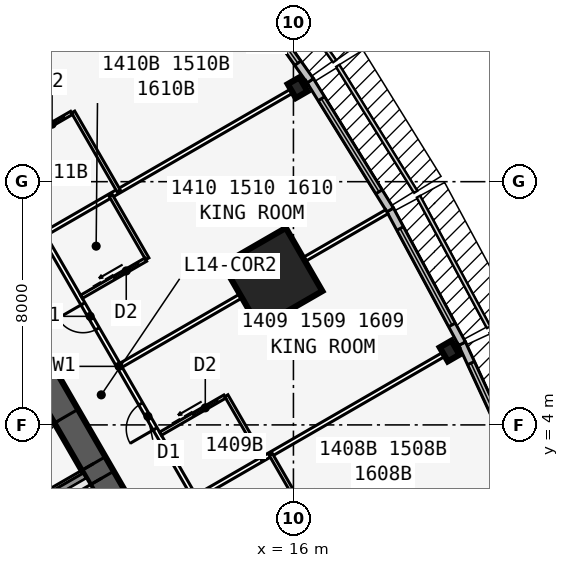
"""IFC4 building model, lengths in metres.
Left out: names, types, materials, properties, quantities, classifications, styles, units other than length and angle.
Written with IfcOpenShell. Run it as: python <this file> out.ifc"""

import sys

from ifc_helpers import new_model, si_unit, direction, frame, frame_2d, origin, origin_2d, place, context, subcontext, project, spatial, rectangle, i_section, extrude, element, fill, save


model = new_model("IFC4")
c1 = context("Model", 3, precision=1e-05, world=origin(), true_north=direction((0.0, 1.0)))
c2 = subcontext(c1, "Body", "Model", "MODEL_VIEW")
j1 = project(units=[si_unit("LENGTHUNIT", "METRE"), si_unit("PLANEANGLEUNIT", "RADIAN")], contexts=[c1])
p1 = place(None, origin())
s1 = spatial("IfcSite", under=j1, at=p1, CompositionType="ELEMENT")
p2 = place(p1, origin())
s2 = spatial("IfcBuilding", under=s1, at=p2, CompositionType="ELEMENT")
p3 = place(p2, frame((0.0, 0.0, 59.1)))
s3 = spatial("IfcBuildingStorey", under=s2, at=p3, CompositionType="ELEMENT", Elevation=59.1)
p4 = place(p3, frame((16.5, -9.526, 0.0), z_axis=(0.0, 0.0, 1.0), x_axis=(-0.499999749417, 0.866025548458, 0.0)))
e1 = element("IfcWall", 1, at=p4, inside=s3, PredefinedType="SHEAR", context=c2, shape_type="SweptSolid", body=[
    extrude(rectangle(XDim=33.0, YDim=0.9, at=frame_2d((16.5, 0.0))), origin(), (0.0, 0.0, 1.0), 3.4),
])
p5 = place(p4, frame((14.15, 0.0, 0.0)))
e2 = element("IfcOpeningElement", 2, at=p5, cuts=e1, PredefinedType="OPENING", context=c2, shape_type="SweptSolid", body=[
    extrude(rectangle(XDim=1.8, YDim=2.13, at=frame_2d((0.9, 1.065))), frame((0.0, 0.46, 0.0), z_axis=(0.0, -1.0, 0.0), x_axis=(1.0, 0.0, 0.0)), (0.0, 0.0, 1.0), 0.92),
])
p6 = place(p4, frame((12.6, 0.0, 0.0)))
e3 = element("IfcOpeningElement", 3, at=p6, cuts=e1, PredefinedType="OPENING", context=c2, shape_type="SweptSolid", body=[
    extrude(rectangle(XDim=1.0, YDim=2.13, at=frame_2d((0.5, 1.065))), frame((0.0, 0.46, 0.0), z_axis=(0.0, -1.0, 0.0), x_axis=(1.0, 0.0, 0.0)), (0.0, 0.0, 1.0), 0.92),
])
for number, where, z_axis, x_axis in (
    (4, (6.429, 0.767, 0.0), (0.0, 0.0, 1.0), (0.866, 0.5, 0.0)),
    (5, (5.329, 2.673, 0.0), (0.0, 0.0, 1.0), (0.866, 0.5, 0.0)),
):
    element("IfcWall", number, at=place(p3, frame(where, z_axis=z_axis, x_axis=x_axis)), inside=s3, PredefinedType="SOLIDWALL", context=c2, shape_type="SweptSolid", body=[
        extrude(rectangle(XDim=3.125, YDim=0.2, at=frame_2d((1.562, 0.0))), origin(), (0.0, 0.0, 1.0), 3.235),
    ])
for number, where, z_axis, x_axis in (
    (6, (21.137, 6.43, 0.0), (0.0, 0.0, 1.0), (0.866, 0.5, 0.0)),
    (7, (16.137, 15.09, 0.0), (0.0, 0.0, 1.0), (0.866, 0.5, 0.0)),
):
    element("IfcColumn", number, at=place(p3, frame(where, z_axis=z_axis, x_axis=x_axis)), inside=s3, PredefinedType="COLUMN", context=c2, shape_type="SweptSolid", body=[
        extrude(i_section(OverallWidth=0.442, OverallDepth=0.531, WebThickness=0.066, FlangeThickness=0.106, at=origin_2d()), origin(), (0.0, 0.0, 1.0), 3.4),
    ])
p7 = place(p3, frame((15.312, 8.84, 0.0), z_axis=(0.0, 0.0, 1.0), x_axis=(0.866025403784, 0.5, 0.0)))
e8 = element("IfcColumn", 8, at=p7, inside=s3, PredefinedType="COLUMN", context=c2, shape_type="SweptSolid", body=[
    extrude(rectangle(XDim=2.4, YDim=2.4, at=origin_2d()), origin(), (0.0, 0.0, 1.0), 3.4),
])
p8 = place(p3, frame((23.648, 2.119, 0.0), z_axis=(0.0, 0.0, 1.0), x_axis=(-0.419203100754, 0.907892482796, 0.0)))
e9 = element("IfcWall", 9, at=p8, inside=s3, PredefinedType="STANDARD", context=c2, shape_type="SweptSolid", body=[
    extrude(rectangle(XDim=5.021, YDim=0.25, at=frame_2d((2.51, 0.0))), origin(), (0.0, 0.0, 1.0), 3.235),
])
p9 = place(p8, frame((0.71, 0.0, 0.45)))
e10 = element("IfcOpeningElement", 10, at=p9, cuts=e9, PredefinedType="OPENING", context=c2, shape_type="SweptSolid", body=[
    extrude(rectangle(XDim=3.6, YDim=2.4, at=frame_2d((1.8, 1.2))), frame((0.0, 0.135, 0.0), z_axis=(0.0, -1.0, 0.0), x_axis=(1.0, 0.0, 0.0)), (0.0, 0.0, 1.0), 0.27),
])
p10 = place(p3, frame((21.547, 6.671, 0.0), z_axis=(0.0, 0.0, 1.0), x_axis=(-0.473412820489, 0.880840678782, 0.0)))
e11 = element("IfcWall", 11, at=p10, inside=s3, PredefinedType="STANDARD", context=c2, shape_type="SweptSolid", body=[
    extrude(rectangle(XDim=5.002, YDim=0.25, at=frame_2d((2.501, 0.0))), origin(), (0.0, 0.0, 1.0), 3.235),
])
p11 = place(p10, frame((0.701, 0.0, 0.45)))
e12 = element("IfcOpeningElement", 12, at=p11, cuts=e11, PredefinedType="OPENING", context=c2, shape_type="SweptSolid", body=[
    extrude(rectangle(XDim=3.6, YDim=2.4, at=frame_2d((1.8, 1.2))), frame((0.0, 0.135, 0.0), z_axis=(0.0, -1.0, 0.0), x_axis=(1.0, 0.0, 0.0)), (0.0, 0.0, 1.0), 0.27),
])
p12 = place(p3, frame((19.182, 11.071, 0.0), z_axis=(0.0, 0.0, 1.0), x_axis=(-0.526132807704, 0.850402415717, 0.0)))
e13 = element("IfcWall", 13, at=p12, inside=s3, PredefinedType="STANDARD", context=c2, shape_type="SweptSolid", body=[
    extrude(rectangle(XDim=5.002, YDim=0.25, at=frame_2d((2.501, 0.0))), origin(), (0.0, 0.0, 1.0), 3.235),
])
p13 = place(p12, frame((0.701, 0.0, 0.45)))
e14 = element("IfcOpeningElement", 14, at=p13, cuts=e13, PredefinedType="OPENING", context=c2, shape_type="SweptSolid", body=[
    extrude(rectangle(XDim=3.6, YDim=2.4, at=frame_2d((1.8, 1.2))), frame((0.0, 0.135, 0.0), z_axis=(0.0, -1.0, 0.0), x_axis=(1.0, 0.0, 0.0)), (0.0, 0.0, 1.0), 0.27),
])
p14 = place(p3, frame((16.555, 15.318, 0.0), z_axis=(0.0, 0.0, 1.0), x_axis=(-0.5766431066, 0.81699616132, 0.0)))
e15 = element("IfcWall", 15, at=p14, inside=s3, PredefinedType="STANDARD", context=c2, shape_type="SweptSolid", body=[
    extrude(rectangle(XDim=5.021, YDim=0.25, at=frame_2d((2.51, 0.0))), origin(), (0.0, 0.0, 1.0), 3.235),
])
p15 = place(p14, frame((0.71, 0.0, 0.45)))
e16 = element("IfcOpeningElement", 16, at=p15, cuts=e15, PredefinedType="OPENING", context=c2, shape_type="SweptSolid", body=[
    extrude(rectangle(XDim=3.6, YDim=2.4, at=frame_2d((1.8, 1.2))), frame((0.0, 0.135, 0.0), z_axis=(0.0, -1.0, 0.0), x_axis=(1.0, 0.0, 0.0)), (0.0, 0.0, 1.0), 0.27),
])
p16 = place(p3, frame((20.027, -10.985, 0.0), z_axis=(0.0, 0.0, 1.0), x_axis=(-0.500001677587, 0.866024435227, 0.0)))
e17 = element("IfcWall", 17, at=p16, inside=s3, PredefinedType="PARTITIONING", context=c2, shape_type="SweptSolid", body=[
    extrude(rectangle(XDim=39.054, YDim=0.15, at=frame_2d((19.527, 0.0))), origin(), (0.0, 0.0, 1.0), 3.235),
])
p17 = place(p16, frame((0.352, 0.0, 0.0)))
e18 = element("IfcOpeningElement", 18, at=p17, cuts=e17, PredefinedType="OPENING", context=c2, shape_type="SweptSolid", body=[
    extrude(rectangle(XDim=0.95, YDim=2.13, at=frame_2d((0.475, 1.065))), frame((0.0, 0.085, 0.0), z_axis=(0.0, -1.0, 0.0), x_axis=(1.0, 0.0, 0.0)), (0.0, 0.0, 1.0), 0.17),
])
p18 = place(p16, frame((10.352, 0.0, 0.0)))
e19 = element("IfcOpeningElement", 19, at=p18, cuts=e17, PredefinedType="OPENING", context=c2, shape_type="SweptSolid", body=[
    extrude(rectangle(XDim=0.95, YDim=2.13, at=frame_2d((0.475, 1.065))), frame((0.0, 0.085, 0.0), z_axis=(0.0, -1.0, 0.0), x_axis=(1.0, 0.0, 0.0)), (0.0, 0.0, 1.0), 0.17),
])
p19 = place(p16, frame((17.152, 0.0, 0.0)))
e20 = element("IfcOpeningElement", 20, at=p19, cuts=e17, PredefinedType="OPENING", context=c2, shape_type="SweptSolid", body=[
    extrude(rectangle(XDim=0.95, YDim=2.13, at=frame_2d((0.475, 1.065))), frame((0.0, 0.085, 0.0), z_axis=(0.0, -1.0, 0.0), x_axis=(1.0, 0.0, 0.0)), (0.0, 0.0, 1.0), 0.17),
])
p20 = place(p16, frame((20.952, 0.0, 0.0)))
e21 = element("IfcOpeningElement", 21, at=p20, cuts=e17, PredefinedType="OPENING", context=c2, shape_type="SweptSolid", body=[
    extrude(rectangle(XDim=0.95, YDim=2.13, at=frame_2d((0.475, 1.065))), frame((0.0, 0.085, 0.0), z_axis=(0.0, -1.0, 0.0), x_axis=(1.0, 0.0, 0.0)), (0.0, 0.0, 1.0), 0.17),
])
p21 = place(p16, frame((27.752, 0.0, 0.0)))
e22 = element("IfcOpeningElement", 22, at=p21, cuts=e17, PredefinedType="OPENING", context=c2, shape_type="SweptSolid", body=[
    extrude(rectangle(XDim=0.95, YDim=2.13, at=frame_2d((0.475, 1.065))), frame((0.0, 0.085, 0.0), z_axis=(0.0, -1.0, 0.0), x_axis=(1.0, 0.0, 0.0)), (0.0, 0.0, 1.0), 0.17),
])
p22 = place(p16, frame((37.752, 0.0, 0.0)))
e23 = element("IfcOpeningElement", 23, at=p22, cuts=e17, PredefinedType="OPENING", context=c2, shape_type="SweptSolid", body=[
    extrude(rectangle(XDim=0.95, YDim=2.13, at=frame_2d((0.475, 1.065))), frame((0.0, 0.085, 0.0), z_axis=(0.0, -1.0, 0.0), x_axis=(1.0, 0.0, 0.0)), (0.0, 0.0, 1.0), 0.17),
])
p23 = place(p3, frame((12.829, 1.633, 0.0), z_axis=(0.0, 0.0, 1.0), x_axis=(0.866026934769, 0.499997348248, 0.0)))
e24 = element("IfcWall", 24, at=p23, inside=s3, PredefinedType="PARTITIONING", context=c2, shape_type="SweptSolid", body=[
    extrude(rectangle(XDim=9.943, YDim=0.15, at=frame_2d((4.971, 0.0))), origin(), (0.0, 0.0, 1.0), 2.389),
])
p24 = place(p3, frame((10.329, 5.963, 0.0), z_axis=(0.0, 0.0, 1.0), x_axis=(0.866021688545, 0.500006434927, 0.0)))
e25 = element("IfcWall", 25, at=p24, inside=s3, PredefinedType="PARTITIONING", context=c2, shape_type="SweptSolid", body=[
    extrude(rectangle(XDim=10.096, YDim=0.15, at=frame_2d((5.048, 0.0))), origin(), (0.0, 0.0, 1.0), 2.389),
])
p25 = place(p3, frame((7.829, 10.293, 0.0), z_axis=(0.0, 0.0, 1.0), x_axis=(0.866016302457, 0.50001576363, 0.0)))
e26 = element("IfcWall", 26, at=p25, inside=s3, PredefinedType="PARTITIONING", context=c2, shape_type="SweptSolid", body=[
    extrude(rectangle(XDim=9.943, YDim=0.15, at=frame_2d((4.972, 0.0))), origin(), (0.0, 0.0, 1.0), 2.389),
])
p26 = place(p3, frame((16.753, 0.435, 0.0), z_axis=(0.0, 0.0, 1.0), x_axis=(-0.499990139034, 0.866031096941, 0.0)))
e27 = element("IfcWall", 27, at=p26, inside=s3, PredefinedType="PLUMBINGWALL", context=c2, shape_type="SweptSolid", body=[
    extrude(rectangle(XDim=3.0, YDim=0.12, at=frame_2d((1.5, 0.0))), origin(), (0.0, 0.0, 1.0), 3.235),
])
p27 = place(p3, frame((14.993, 2.883, 0.0), z_axis=(0.0, 0.0, 1.0), x_axis=(-0.500001309137, 0.866024647952, 0.0)))
e28 = element("IfcWall", 28, at=p27, inside=s3, PredefinedType="PLUMBINGWALL", context=c2, shape_type="SweptSolid", body=[
    extrude(rectangle(XDim=2.4, YDim=0.12, at=frame_2d((1.2, 0.0))), origin(), (0.0, 0.0, 1.0), 3.235),
])
p28 = place(p3, frame((11.628, 3.711, 0.0), z_axis=(0.0, 0.0, 1.0), x_axis=(0.866048967903, 0.499959183527, 0.0)))
e29 = element("IfcWall", 29, at=p28, inside=s3, PredefinedType="PLUMBINGWALL", context=c2, shape_type="SweptSolid", body=[
    extrude(rectangle(XDim=2.44, YDim=0.12, at=frame_2d((1.22, 0.0))), origin(), (0.0, 0.0, 1.0), 3.235),
])
p29 = place(p28, frame((1.25, 0.0, 0.0)))
e30 = element("IfcOpeningElement", 30, at=p29, cuts=e29, PredefinedType="OPENING", context=c2, shape_type="SweptSolid", body=[
    extrude(rectangle(XDim=0.9, YDim=2.13, at=frame_2d((0.45, 1.065))), frame((0.0, 0.07, 0.0), z_axis=(0.0, -1.0, 0.0), x_axis=(1.0, 0.0, 0.0)), (0.0, 0.0, 1.0), 0.14),
])
p30 = place(p3, frame((11.194, 9.465, 0.0), z_axis=(0.0, 0.0, 1.0), x_axis=(-0.500077600433, 0.865980596518, 0.0)))
e31 = element("IfcWall", 31, at=p30, inside=s3, PredefinedType="PLUMBINGWALL", context=c2, shape_type="SweptSolid", body=[
    extrude(rectangle(XDim=2.4, YDim=0.12, at=frame_2d((1.2, 0.0))), origin(), (0.0, 0.0, 1.0), 3.235),
])
p31 = place(p3, frame((9.029, 8.215, 0.0), z_axis=(0.0, 0.0, 1.0), x_axis=(0.866023955769, 0.500002508028, 0.0)))
e32 = element("IfcWall", 32, at=p31, inside=s3, PredefinedType="PLUMBINGWALL", context=c2, shape_type="SweptSolid", body=[
    extrude(rectangle(XDim=2.44, YDim=0.12, at=frame_2d((1.22, 0.0))), origin(), (0.0, 0.0, 1.0), 3.235),
])
p32 = place(p31, frame((1.25, 0.0, 0.0)))
e33 = element("IfcOpeningElement", 33, at=p32, cuts=e32, PredefinedType="OPENING", context=c2, shape_type="SweptSolid", body=[
    extrude(rectangle(XDim=0.9, YDim=2.13, at=frame_2d((0.45, 1.065))), frame((0.0, 0.07, 0.0), z_axis=(0.0, -1.0, 0.0), x_axis=(1.0, 0.0, 0.0)), (0.0, 0.0, 1.0), 0.14),
])
p33 = place(p3, frame((10.253, 11.693, 0.0), z_axis=(0.0, 0.0, 1.0), x_axis=(-0.50002537861, 0.866010750942, 0.0)))
e34 = element("IfcWall", 34, at=p33, inside=s3, PredefinedType="PLUMBINGWALL", context=c2, shape_type="SweptSolid", body=[
    extrude(rectangle(XDim=3.0, YDim=0.12, at=frame_2d((1.5, 0.0))), origin(), (0.0, 0.0, 1.0), 3.235),
])
p34 = place(p3, frame((6.329, 12.891, 0.0), z_axis=(0.0, 0.0, 1.0), x_axis=(0.866035715982, 0.499982138324, 0.0)))
e35 = element("IfcWall", 35, at=p34, inside=s3, PredefinedType="PLUMBINGWALL", context=c2, shape_type="SweptSolid", body=[
    extrude(rectangle(XDim=2.74, YDim=0.12, at=frame_2d((1.37, 0.0))), origin(), (0.0, 0.0, 1.0), 3.235),
])
p35 = place(p34, frame((1.55, 0.0, 0.0)))
e36 = element("IfcOpeningElement", 36, at=p35, cuts=e35, PredefinedType="OPENING", context=c2, shape_type="SweptSolid", body=[
    extrude(rectangle(XDim=0.9, YDim=2.13, at=frame_2d((0.45, 1.065))), frame((0.0, 0.07, 0.0), z_axis=(0.0, -1.0, 0.0), x_axis=(1.0, 0.0, 0.0)), (0.0, 0.0, 1.0), 0.14),
])
p36 = place(p9, origin())
e37 = element("IfcWindow", 37, at=p36, inside=s3, PartitioningType="SINGLE_PANEL", PredefinedType="WINDOW", context=c2, shape_type="SweptSolid", body=[
    extrude(rectangle(XDim=3.6, YDim=2.4, at=frame_2d((1.8, 1.2))), frame((0.0, 0.03, 0.0), z_axis=(0.0, -1.0, 0.0), x_axis=(1.0, 0.0, 0.0)), (0.0, 0.0, 1.0), 0.06),
])
fill(e10, e37)
p37 = place(p11, origin())
e38 = element("IfcWindow", 38, at=p37, inside=s3, PartitioningType="SINGLE_PANEL", PredefinedType="WINDOW", context=c2, shape_type="SweptSolid", body=[
    extrude(rectangle(XDim=3.6, YDim=2.4, at=frame_2d((1.8, 1.2))), frame((0.0, 0.03, 0.0), z_axis=(0.0, -1.0, 0.0), x_axis=(1.0, 0.0, 0.0)), (0.0, 0.0, 1.0), 0.06),
])
fill(e12, e38)
p38 = place(p13, origin())
e39 = element("IfcWindow", 39, at=p38, inside=s3, PartitioningType="SINGLE_PANEL", PredefinedType="WINDOW", context=c2, shape_type="SweptSolid", body=[
    extrude(rectangle(XDim=3.6, YDim=2.4, at=frame_2d((1.8, 1.2))), frame((0.0, 0.03, 0.0), z_axis=(0.0, -1.0, 0.0), x_axis=(1.0, 0.0, 0.0)), (0.0, 0.0, 1.0), 0.06),
])
fill(e14, e39)
p39 = place(p15, origin())
e40 = element("IfcWindow", 40, at=p39, inside=s3, PartitioningType="SINGLE_PANEL", PredefinedType="WINDOW", context=c2, shape_type="SweptSolid", body=[
    extrude(rectangle(XDim=3.6, YDim=2.4, at=frame_2d((1.8, 1.2))), frame((0.0, 0.03, 0.0), z_axis=(0.0, -1.0, 0.0), x_axis=(1.0, 0.0, 0.0)), (0.0, 0.0, 1.0), 0.06),
])
fill(e16, e40)
p40 = place(p29, origin())
e41 = element("IfcDoor", 41, at=p40, inside=s3, OperationType="SLIDING_TO_LEFT", PredefinedType="DOOR", context=c2, shape_type="SweptSolid", body=[
    extrude(rectangle(XDim=0.9, YDim=2.13, at=frame_2d((0.45, 1.065))), frame((0.0, 0.025, 0.0), z_axis=(0.0, -1.0, 0.0), x_axis=(1.0, 0.0, 0.0)), (0.0, 0.0, 1.0), 0.05),
])
fill(e30, e41)
p41 = place(p19, origin())
e42 = element("IfcDoor", 42, at=p41, inside=s3, OperationType="SINGLE_SWING_LEFT", PredefinedType="DOOR", context=c2, shape_type="SweptSolid", body=[
    extrude(rectangle(XDim=0.95, YDim=2.13, at=frame_2d((0.475, 1.065))), frame((0.0, 0.025, 0.0), z_axis=(0.0, -1.0, 0.0), x_axis=(1.0, 0.0, 0.0)), (0.0, 0.0, 1.0), 0.05),
])
fill(e20, e42)
p42 = place(p32, origin())
e43 = element("IfcDoor", 43, at=p42, inside=s3, OperationType="SLIDING_TO_LEFT", PredefinedType="DOOR", context=c2, shape_type="SweptSolid", body=[
    extrude(rectangle(XDim=0.9, YDim=2.13, at=frame_2d((0.45, 1.065))), frame((0.0, 0.025, 0.0), z_axis=(0.0, -1.0, 0.0), x_axis=(1.0, 0.0, 0.0)), (0.0, 0.0, 1.0), 0.05),
])
fill(e33, e43)
p43 = place(p20, origin())
e44 = element("IfcDoor", 44, at=p43, inside=s3, OperationType="SINGLE_SWING_RIGHT", PredefinedType="DOOR", context=c2, shape_type="SweptSolid", body=[
    extrude(rectangle(XDim=0.95, YDim=2.13, at=frame_2d((0.475, 1.065))), frame((0.0, 0.025, 0.0), z_axis=(0.0, -1.0, 0.0), x_axis=(1.0, 0.0, 0.0)), (0.0, 0.0, 1.0), 0.05),
])
fill(e21, e44)
p44 = place(p35, origin())
e45 = element("IfcDoor", 45, at=p44, inside=s3, OperationType="SLIDING_TO_LEFT", PredefinedType="DOOR", context=c2, shape_type="SweptSolid", body=[
    extrude(rectangle(XDim=0.9, YDim=2.13, at=frame_2d((0.45, 1.065))), frame((0.0, 0.025, 0.0), z_axis=(0.0, -1.0, 0.0), x_axis=(1.0, 0.0, 0.0)), (0.0, 0.0, 1.0), 0.05),
])
fill(e36, e45)
p45 = place(p5, origin())
e46 = element("IfcDoor", 46, at=p45, inside=s3, OperationType="DOUBLE_DOOR_SINGLE_SWING", PredefinedType="DOOR", context=c2, shape_type="SweptSolid", body=[
    extrude(rectangle(XDim=1.8, YDim=2.13, at=frame_2d((0.9, 1.065))), frame((0.0, 0.025, 0.0), z_axis=(0.0, -1.0, 0.0), x_axis=(1.0, 0.0, 0.0)), (0.0, 0.0, 1.0), 0.05),
])
fill(e2, e46)
p46 = place(p6, origin())
e47 = element("IfcDoor", 47, at=p46, inside=s3, OperationType="SINGLE_SWING_RIGHT", PredefinedType="DOOR", context=c2, shape_type="SweptSolid", body=[
    extrude(rectangle(XDim=1.0, YDim=2.13, at=frame_2d((0.5, 1.065))), frame((0.0, 0.025, 0.0), z_axis=(0.0, -1.0, 0.0), x_axis=(1.0, 0.0, 0.0)), (0.0, 0.0, 1.0), 0.05),
])
fill(e3, e47)
save(model, sys.argv[1])
